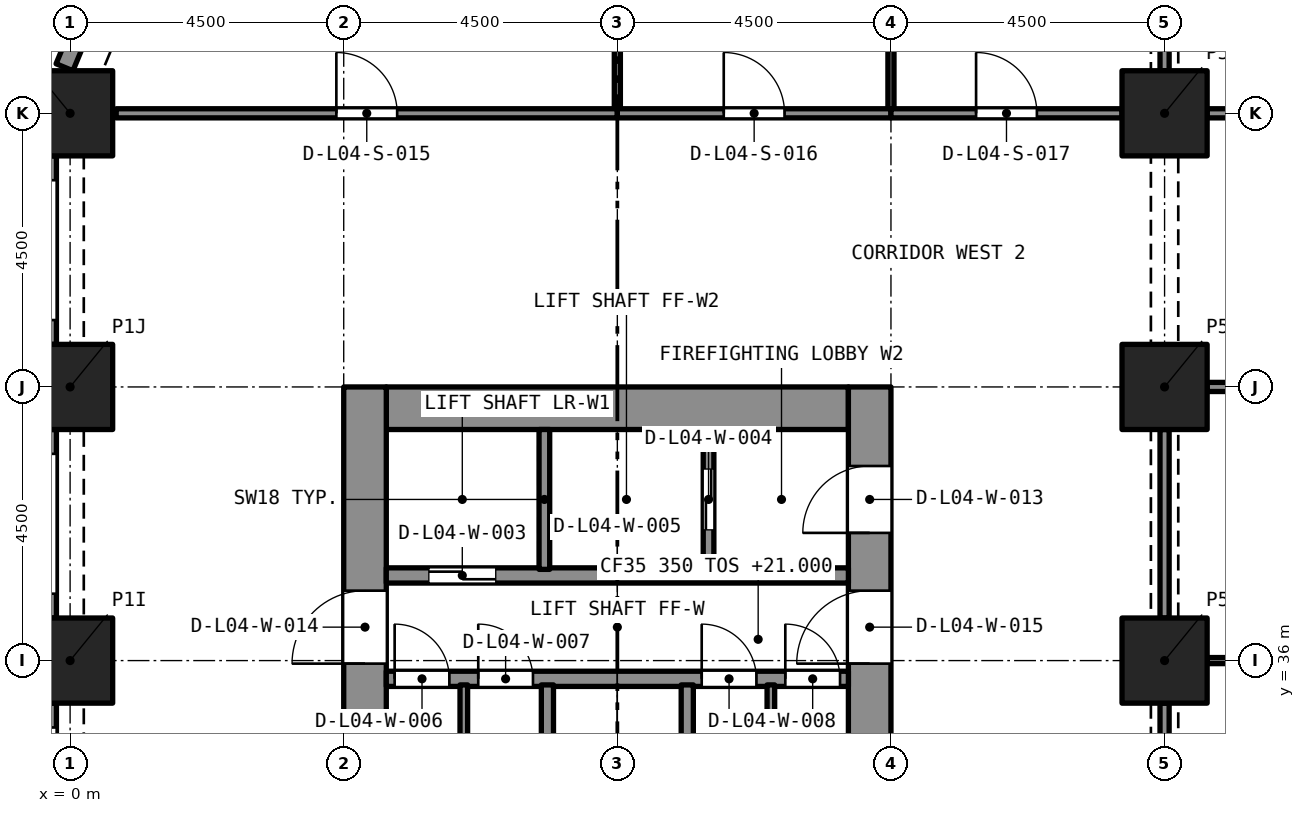
"""IFC4 building model, lengths in metres.
Left out: names, types, materials, properties, quantities, classifications, styles, units other than length and angle.
Written with IfcOpenShell. Run it as: python <this file> out.ifc"""

import sys

from ifc_helpers import new_model, si_unit, direction, frame, frame_2d, origin, origin_2d, place, context, subcontext, project, spatial, rectangle, extrude, element, fill, save


model = new_model("IFC4")
c1 = context("Model", 3, precision=1e-05, world=origin(), true_north=direction((0.0, 1.0)))
c2 = subcontext(c1, "Body", "Model", "MODEL_VIEW")
j1 = project(units=[si_unit("LENGTHUNIT", "METRE"), si_unit("PLANEANGLEUNIT", "RADIAN")], contexts=[c1])
p1 = place(None, origin())
s1 = spatial("IfcSite", under=j1, at=p1, CompositionType="ELEMENT")
p2 = place(p1, origin())
s2 = spatial("IfcBuilding", under=s1, at=p2, CompositionType="ELEMENT")
p3 = place(p2, frame((0.0, 0.0, 21.0)))
s3 = spatial("IfcBuildingStorey", under=s2, at=p3, CompositionType="ELEMENT", Elevation=21.0)
for number, where, z_axis, x_axis in (
    (1, (0.0, 36.0, 0.0), (0.0, 0.0, 1.0), (1.0, 0.0, 0.0)),
    (2, (18.0, 36.0, 0.0), (0.0, 0.0, 1.0), (1.0, 0.0, 0.0)),
    (3, (0.0, 40.5, 0.0), (0.0, 0.0, 1.0), (1.0, 0.0, 0.0)),
    (4, (18.0, 40.5, 0.0), (0.0, 0.0, 1.0), (1.0, 0.0, 0.0)),
    (5, (0.0, 45.0, 0.0), (0.0, 0.0, 1.0), (1.0, 0.0, 0.0)),
    (6, (18.0, 45.0, 0.0), (0.0, 0.0, 1.0), (1.0, 0.0, 0.0)),
):
    element("IfcColumn", number, at=place(p3, frame(where, z_axis=z_axis, x_axis=x_axis)), inside=s3, PredefinedType="COLUMN", context=c2, shape_type="SweptSolid", body=[
        extrude(rectangle(XDim=1.4, YDim=1.4, at=origin_2d()), origin(), (0.0, 0.0, 1.0), 5.0),
    ])
p4 = place(p3, frame((5.2, 40.15, 0.0), z_axis=(0.0, 0.0, 1.0), x_axis=(1.0, 0.0, 0.0)))
e7 = element("IfcWall", 7, at=p4, inside=s3, PredefinedType="SOLIDWALL", context=c2, shape_type="SweptSolid", body=[
    extrude(rectangle(XDim=7.6, YDim=0.7, at=frame_2d((3.8, 0.0))), origin(), (0.0, 0.0, 1.0), 5.0),
])
p5 = place(p3, frame((4.85, 27.0, 0.0), z_axis=(0.0, 0.0, 1.0), x_axis=(0.0, 1.0, 0.0)))
e8 = element("IfcWall", 8, at=p5, inside=s3, PredefinedType="SOLIDWALL", context=c2, shape_type="SweptSolid", body=[
    extrude(rectangle(XDim=13.5, YDim=0.7, at=frame_2d((6.75, 0.0))), origin(), (0.0, 0.0, 1.0), 5.0),
])
p6 = place(p5, frame((8.95, 0.0, 0.0)))
e9 = element("IfcOpeningElement", 9, at=p6, cuts=e8, PredefinedType="OPENING", context=c2, shape_type="SweptSolid", body=[
    extrude(rectangle(XDim=1.2, YDim=2.1, at=frame_2d((0.6, 1.05))), frame((0.0, 0.36, 0.0), z_axis=(0.0, -1.0, 0.0), x_axis=(1.0, 0.0, 0.0)), (0.0, 0.0, 1.0), 0.72),
])
p7 = place(p3, frame((13.15, 27.0, 0.0), z_axis=(0.0, 0.0, 1.0), x_axis=(0.0, 1.0, 0.0)))
e10 = element("IfcWall", 10, at=p7, inside=s3, PredefinedType="SOLIDWALL", context=c2, shape_type="SweptSolid", body=[
    extrude(rectangle(XDim=13.5, YDim=0.7, at=frame_2d((6.75, 0.0))), origin(), (0.0, 0.0, 1.0), 5.0),
])
p8 = place(p7, frame((11.1, 0.0, 0.0)))
e11 = element("IfcOpeningElement", 11, at=p8, cuts=e10, PredefinedType="OPENING", context=c2, shape_type="SweptSolid", body=[
    extrude(rectangle(XDim=1.1, YDim=2.1, at=frame_2d((0.55, 1.05))), frame((0.0, 0.36, 0.0), z_axis=(0.0, -1.0, 0.0), x_axis=(1.0, 0.0, 0.0)), (0.0, 0.0, 1.0), 0.72),
])
p9 = place(p7, frame((8.95, 0.0, 0.0)))
e12 = element("IfcOpeningElement", 12, at=p9, cuts=e10, PredefinedType="OPENING", context=c2, shape_type="SweptSolid", body=[
    extrude(rectangle(XDim=1.2, YDim=2.1, at=frame_2d((0.6, 1.05))), frame((0.0, 0.36, 0.0), z_axis=(0.0, -1.0, 0.0), x_axis=(1.0, 0.0, 0.0)), (0.0, 0.0, 1.0), 0.72),
])
p10 = place(p3, frame((-0.092, 45.757, 0.0), z_axis=(0.0, 0.0, 1.0), x_axis=(0.382737135771, 0.923857286003, 0.0)))
e13 = element("IfcWall", 13, at=p10, inside=s3, PredefinedType="SOLIDWALL", context=c2, shape_type="SweptSolid", body=[
    extrude(rectangle(XDim=1.865, YDim=0.3, at=frame_2d((0.933, 0.0))), origin(), (0.0, 0.0, 1.0), 5.0),
])
p11 = place(p10, frame((0.508, 0.0, 0.45)))
e14 = element("IfcOpeningElement", 14, at=p11, cuts=e13, PredefinedType="OPENING", context=c2, shape_type="SweptSolid", body=[
    extrude(rectangle(XDim=1.1, YDim=3.3, at=frame_2d((0.55, 1.65))), frame((0.0, 0.16, 0.0), z_axis=(0.0, -1.0, 0.0), x_axis=(1.0, 0.0, 0.0)), (0.0, 0.0, 1.0), 0.32),
])
p12 = place(p3, frame((-0.375, 41.2, 0.0), z_axis=(0.0, 0.0, 1.0), x_axis=(0.0, 1.0, 0.0)))
e15 = element("IfcWall", 15, at=p12, inside=s3, PredefinedType="SOLIDWALL", context=c2, shape_type="SweptSolid", body=[
    extrude(rectangle(XDim=3.1, YDim=0.3, at=frame_2d((1.55, 0.0))), origin(), (0.0, 0.0, 1.0), 5.0),
])
p13 = place(p12, frame((0.4, 0.0, 0.45)))
e16 = element("IfcOpeningElement", 16, at=p13, cuts=e15, PredefinedType="OPENING", context=c2, shape_type="SweptSolid", body=[
    extrude(rectangle(XDim=2.3, YDim=3.3, at=frame_2d((1.15, 1.65))), frame((0.0, 0.16, 0.0), z_axis=(0.0, -1.0, 0.0), x_axis=(1.0, 0.0, 0.0)), (0.0, 0.0, 1.0), 0.32),
])
p14 = place(p3, frame((-0.375, 36.7, 0.0), z_axis=(0.0, 0.0, 1.0), x_axis=(0.0, 1.0, 0.0)))
e17 = element("IfcWall", 17, at=p14, inside=s3, PredefinedType="SOLIDWALL", context=c2, shape_type="SweptSolid", body=[
    extrude(rectangle(XDim=3.1, YDim=0.3, at=frame_2d((1.55, 0.0))), origin(), (0.0, 0.0, 1.0), 5.0),
])
p15 = place(p14, frame((0.4, 0.0, 0.45)))
e18 = element("IfcOpeningElement", 18, at=p15, cuts=e17, PredefinedType="OPENING", context=c2, shape_type="SweptSolid", body=[
    extrude(rectangle(XDim=2.3, YDim=3.3, at=frame_2d((1.15, 1.65))), frame((0.0, 0.16, 0.0), z_axis=(0.0, -1.0, 0.0), x_axis=(1.0, 0.0, 0.0)), (0.0, 0.0, 1.0), 0.32),
])
p16 = place(p3, frame((-0.375, 32.2, 0.0), z_axis=(0.0, 0.0, 1.0), x_axis=(0.0, 1.0, 0.0)))
e19 = element("IfcWall", 19, at=p16, inside=s3, PredefinedType="SOLIDWALL", context=c2, shape_type="SweptSolid", body=[
    extrude(rectangle(XDim=3.1, YDim=0.3, at=frame_2d((1.55, 0.0))), origin(), (0.0, 0.0, 1.0), 5.0),
])
p17 = place(p16, frame((0.4, 0.0, 0.45)))
e20 = element("IfcOpeningElement", 20, at=p17, cuts=e19, PredefinedType="OPENING", context=c2, shape_type="SweptSolid", body=[
    extrude(rectangle(XDim=2.3, YDim=3.3, at=frame_2d((1.15, 1.65))), frame((0.0, 0.16, 0.0), z_axis=(0.0, -1.0, 0.0), x_axis=(1.0, 0.0, 0.0)), (0.0, 0.0, 1.0), 0.32),
])
p18 = place(p3, frame((5.2, 35.7, 0.0), z_axis=(0.0, 0.0, 1.0), x_axis=(1.0, 0.0, 0.0)))
e21 = element("IfcWall", 21, at=p18, inside=s3, PredefinedType="SOLIDWALL", context=c2, shape_type="SweptSolid", body=[
    extrude(rectangle(XDim=7.6, YDim=0.25, at=frame_2d((3.8, 0.0))), origin(), (0.0, 0.0, 1.0), 4.65),
])
p19 = place(p18, frame((0.137, 0.0, 0.0)))
e22 = element("IfcOpeningElement", 22, at=p19, cuts=e21, PredefinedType="OPENING", context=c2, shape_type="SweptSolid", body=[
    extrude(rectangle(XDim=0.9, YDim=2.1, at=frame_2d((0.45, 1.05))), frame((0.0, 0.135, 0.0), z_axis=(0.0, -1.0, 0.0), x_axis=(1.0, 0.0, 0.0)), (0.0, 0.0, 1.0), 0.27),
])
p20 = place(p18, frame((1.512, 0.0, 0.0)))
e23 = element("IfcOpeningElement", 23, at=p20, cuts=e21, PredefinedType="OPENING", context=c2, shape_type="SweptSolid", body=[
    extrude(rectangle(XDim=0.9, YDim=2.1, at=frame_2d((0.45, 1.05))), frame((0.0, 0.135, 0.0), z_axis=(0.0, -1.0, 0.0), x_axis=(1.0, 0.0, 0.0)), (0.0, 0.0, 1.0), 0.27),
])
p21 = place(p18, frame((5.188, 0.0, 0.0)))
e24 = element("IfcOpeningElement", 24, at=p21, cuts=e21, PredefinedType="OPENING", context=c2, shape_type="SweptSolid", body=[
    extrude(rectangle(XDim=0.9, YDim=2.1, at=frame_2d((0.45, 1.05))), frame((0.0, 0.135, 0.0), z_axis=(0.0, -1.0, 0.0), x_axis=(1.0, 0.0, 0.0)), (0.0, 0.0, 1.0), 0.27),
])
p22 = place(p18, frame((6.562, 0.0, 0.0)))
e25 = element("IfcOpeningElement", 25, at=p22, cuts=e21, PredefinedType="OPENING", context=c2, shape_type="SweptSolid", body=[
    extrude(rectangle(XDim=0.9, YDim=2.1, at=frame_2d((0.45, 1.05))), frame((0.0, 0.135, 0.0), z_axis=(0.0, -1.0, 0.0), x_axis=(1.0, 0.0, 0.0)), (0.0, 0.0, 1.0), 0.27),
])
p23 = place(p3, frame((5.2, 37.4, 0.0), z_axis=(0.0, 0.0, 1.0), x_axis=(1.0, 0.0, 0.0)))
e26 = element("IfcWall", 26, at=p23, inside=s3, PredefinedType="SOLIDWALL", context=c2, shape_type="SweptSolid", body=[
    extrude(rectangle(XDim=7.6, YDim=0.25, at=frame_2d((3.8, 0.0))), origin(), (0.0, 0.0, 1.0), 4.65),
])
p24 = place(p23, frame((0.7, 0.0, 0.0)))
e27 = element("IfcOpeningElement", 27, at=p24, cuts=e26, PredefinedType="OPENING", context=c2, shape_type="SweptSolid", body=[
    extrude(rectangle(XDim=1.1, YDim=2.4, at=frame_2d((0.55, 1.2))), frame((0.0, 0.135, 0.0), z_axis=(0.0, -1.0, 0.0), x_axis=(1.0, 0.0, 0.0)), (0.0, 0.0, 1.0), 0.27),
])
for number, where, z_axis, x_axis in (
    (28, (7.85, 33.3, 0.0), (0.0, 0.0, 1.0), (0.0, 1.0, 0.0)),
    (29, (10.15, 33.3, 0.0), (0.0, 0.0, 1.0), (0.0, 1.0, 0.0)),
):
    element("IfcWall", number, at=place(p3, frame(where, z_axis=z_axis, x_axis=x_axis)), inside=s3, PredefinedType="SOLIDWALL", context=c2, shape_type="SweptSolid", body=[
        extrude(rectangle(XDim=2.3, YDim=0.2, at=frame_2d((1.15, 0.0))), origin(), (0.0, 0.0, 1.0), 4.65),
    ])
p25 = place(p3, frame((7.8, 37.5, 0.0), z_axis=(0.0, 0.0, 1.0), x_axis=(0.0, 1.0, 0.0)))
e30 = element("IfcWall", 30, at=p25, inside=s3, PredefinedType="SOLIDWALL", context=c2, shape_type="SweptSolid", body=[
    extrude(rectangle(XDim=2.3, YDim=0.175, at=frame_2d((1.15, 0.0))), origin(), (0.0, 0.0, 1.0), 4.65),
])
p26 = place(p3, frame((10.5, 37.5, 0.0), z_axis=(0.0, 0.0, 1.0), x_axis=(0.0, 1.0, 0.0)))
e31 = element("IfcWall", 31, at=p26, inside=s3, PredefinedType="SOLIDWALL", context=c2, shape_type="SweptSolid", body=[
    extrude(rectangle(XDim=2.3, YDim=0.175, at=frame_2d((1.15, 0.0))), origin(), (0.0, 0.0, 1.0), 4.65),
])
p27 = place(p26, frame((0.65, 0.0, 0.0)))
e32 = element("IfcOpeningElement", 32, at=p27, cuts=e31, PredefinedType="OPENING", context=c2, shape_type="SweptSolid", body=[
    extrude(rectangle(XDim=1.0, YDim=2.1, at=frame_2d((0.5, 1.05))), frame((0.0, 0.097, 0.0), z_axis=(0.0, -1.0, 0.0), x_axis=(1.0, 0.0, 0.0)), (0.0, 0.0, 1.0), 0.195),
])
for number, where, z_axis, x_axis in (
    (33, (6.475, 33.3, 0.0), (0.0, 0.0, 1.0), (0.0, 1.0, 0.0)),
    (34, (11.525, 33.3, 0.0), (0.0, 0.0, 1.0), (0.0, 1.0, 0.0)),
):
    element("IfcWall", number, at=place(p3, frame(where, z_axis=z_axis, x_axis=x_axis)), inside=s3, PredefinedType="PARTITIONING", context=c2, shape_type="SweptSolid", body=[
        extrude(rectangle(XDim=2.3, YDim=0.125, at=frame_2d((1.15, 0.0))), origin(), (0.0, 0.0, 1.0), 4.65),
    ])
p28 = place(p3, frame((18.7, 36.0, 0.0), z_axis=(0.0, 0.0, 1.0), x_axis=(1.0, 0.0, 0.0)))
e35 = element("IfcWall", 35, at=p28, inside=s3, PredefinedType="PARTITIONING", context=c2, shape_type="SweptSolid", body=[
    extrude(rectangle(XDim=12.1, YDim=0.1, at=frame_2d((6.05, 0.0))), origin(), (0.0, 0.0, 1.0), 4.55),
])
p29 = place(p3, frame((18.0, 32.2, 0.0), z_axis=(0.0, 0.0, 1.0), x_axis=(0.0, 1.0, 0.0)))
e36 = element("IfcWall", 36, at=p29, inside=s3, PredefinedType="PARTITIONING", context=c2, shape_type="SweptSolid", body=[
    extrude(rectangle(XDim=3.1, YDim=0.15, at=frame_2d((1.55, 0.0))), origin(), (0.0, 0.0, 1.0), 4.18),
])
p30 = place(p3, frame((30.8, 40.5, 0.0), z_axis=(0.0, 0.0, 1.0), x_axis=(-1.0, 0.0, 0.0)))
e37 = element("IfcWall", 37, at=p30, inside=s3, PredefinedType="PARTITIONING", context=c2, shape_type="SweptSolid", body=[
    extrude(rectangle(XDim=12.1, YDim=0.15, at=frame_2d((6.05, 0.0))), origin(), (0.0, 0.0, 1.0), 4.55),
])
p31 = place(p30, frame((5.45, 0.0, 0.0)))
e38 = element("IfcOpeningElement", 38, at=p31, cuts=e37, PredefinedType="OPENING", context=c2, shape_type="SweptSolid", body=[
    extrude(rectangle(XDim=1.2, YDim=2.1, at=frame_2d((0.6, 1.05))), frame((0.0, 0.085, 0.0), z_axis=(0.0, -1.0, 0.0), x_axis=(1.0, 0.0, 0.0)), (0.0, 0.0, 1.0), 0.17),
])
p32 = place(p3, frame((18.0, 36.7, 0.0), z_axis=(0.0, 0.0, 1.0), x_axis=(0.0, 1.0, 0.0)))
e39 = element("IfcWall", 39, at=p32, inside=s3, PredefinedType="PARTITIONING", context=c2, shape_type="SweptSolid", body=[
    extrude(rectangle(XDim=3.1, YDim=0.15, at=frame_2d((1.55, 0.0))), origin(), (0.0, 0.0, 1.0), 4.18),
])
p33 = place(p3, frame((18.7, 45.0, 0.0), z_axis=(0.0, 0.0, 1.0), x_axis=(1.0, 0.0, 0.0)))
e40 = element("IfcWall", 40, at=p33, inside=s3, PredefinedType="PARTITIONING", context=c2, shape_type="SweptSolid", body=[
    extrude(rectangle(XDim=8.3, YDim=0.15, at=frame_2d((4.15, 0.0))), origin(), (0.0, 0.0, 1.0), 4.55),
])
p34 = place(p33, frame((3.75, 0.0, 0.0)))
e41 = element("IfcOpeningElement", 41, at=p34, cuts=e40, PredefinedType="OPENING", context=c2, shape_type="SweptSolid", body=[
    extrude(rectangle(XDim=0.8, YDim=2.1, at=frame_2d((0.4, 1.05))), frame((0.0, 0.085, 0.0), z_axis=(0.0, -1.0, 0.0), x_axis=(1.0, 0.0, 0.0)), (0.0, 0.0, 1.0), 0.17),
])
p35 = place(p3, frame((18.0, 45.7, 0.0), z_axis=(0.0, 0.0, 1.0), x_axis=(0.0, 1.0, 0.0)))
e42 = element("IfcWall", 42, at=p35, inside=s3, PredefinedType="PARTITIONING", context=c2, shape_type="SweptSolid", body=[
    extrude(rectangle(XDim=3.1, YDim=0.15, at=frame_2d((1.55, 0.0))), origin(), (0.0, 0.0, 1.0), 4.18),
])
p36 = place(p3, frame((9.0, 45.075, 0.0), z_axis=(0.0, 0.0, 1.0), x_axis=(0.0, 1.0, 0.0)))
e43 = element("IfcWall", 43, at=p36, inside=s3, PredefinedType="PARTITIONING", context=c2, shape_type="SweptSolid", body=[
    extrude(rectangle(XDim=3.725, YDim=0.1, at=frame_2d((1.863, 0.0))), origin(), (0.0, 0.0, 1.0), 4.65),
])
p37 = place(p3, frame((0.758, 45.0, 0.0), z_axis=(0.0, 0.0, 1.0), x_axis=(1.0, 0.0, 0.0)))
e44 = element("IfcWall", 44, at=p37, inside=s3, PredefinedType="PARTITIONING", context=c2, shape_type="SweptSolid", body=[
    extrude(rectangle(XDim=8.242, YDim=0.15, at=frame_2d((4.121, 0.0))), origin(), (0.0, 0.0, 1.0), 4.65),
])
p38 = place(p37, frame((3.621, 0.0, 0.0)))
e45 = element("IfcOpeningElement", 45, at=p38, cuts=e44, PredefinedType="OPENING", context=c2, shape_type="SweptSolid", body=[
    extrude(rectangle(XDim=1.0, YDim=2.1, at=frame_2d((0.5, 1.05))), frame((0.0, 0.085, 0.0), z_axis=(0.0, -1.0, 0.0), x_axis=(1.0, 0.0, 0.0)), (0.0, 0.0, 1.0), 0.17),
])
p39 = place(p3, frame((13.5, 45.075, 0.0), z_axis=(0.0, 0.0, 1.0), x_axis=(0.0, 1.0, 0.0)))
e46 = element("IfcWall", 46, at=p39, inside=s3, PredefinedType="PARTITIONING", context=c2, shape_type="SweptSolid", body=[
    extrude(rectangle(XDim=3.725, YDim=0.1, at=frame_2d((1.863, 0.0))), origin(), (0.0, 0.0, 1.0), 4.65),
])
p40 = place(p3, frame((9.0, 45.0, 0.0), z_axis=(0.0, 0.0, 1.0), x_axis=(1.0, 0.0, 0.0)))
e47 = element("IfcWall", 47, at=p40, inside=s3, PredefinedType="PARTITIONING", context=c2, shape_type="SweptSolid", body=[
    extrude(rectangle(XDim=4.5, YDim=0.15, at=frame_2d((2.25, 0.0))), origin(), (0.0, 0.0, 1.0), 4.65),
])
p41 = place(p40, frame((1.75, 0.0, 0.0)))
e48 = element("IfcOpeningElement", 48, at=p41, cuts=e47, PredefinedType="OPENING", context=c2, shape_type="SweptSolid", body=[
    extrude(rectangle(XDim=1.0, YDim=2.1, at=frame_2d((0.5, 1.05))), frame((0.0, 0.085, 0.0), z_axis=(0.0, -1.0, 0.0), x_axis=(1.0, 0.0, 0.0)), (0.0, 0.0, 1.0), 0.17),
])
p42 = place(p3, frame((13.5, 45.0, 0.0), z_axis=(0.0, 0.0, 1.0), x_axis=(1.0, 0.0, 0.0)))
e49 = element("IfcWall", 49, at=p42, inside=s3, PredefinedType="PARTITIONING", context=c2, shape_type="SweptSolid", body=[
    extrude(rectangle(XDim=3.8, YDim=0.15, at=frame_2d((1.9, 0.0))), origin(), (0.0, 0.0, 1.0), 4.65),
])
p43 = place(p42, frame((1.4, 0.0, 0.0)))
e50 = element("IfcOpeningElement", 50, at=p43, cuts=e49, PredefinedType="OPENING", context=c2, shape_type="SweptSolid", body=[
    extrude(rectangle(XDim=1.0, YDim=2.1, at=frame_2d((0.5, 1.05))), frame((0.0, 0.085, 0.0), z_axis=(0.0, -1.0, 0.0), x_axis=(1.0, 0.0, 0.0)), (0.0, 0.0, 1.0), 0.17),
])
p44 = place(p24, origin())
e51 = element("IfcDoor", 51, at=p44, inside=s3, OperationType="SLIDING_TO_LEFT", PredefinedType="DOOR", context=c2, shape_type="SweptSolid", body=[
    extrude(rectangle(XDim=1.1, YDim=2.4, at=frame_2d((0.55, 1.2))), frame((0.0, 0.025, 0.0), z_axis=(0.0, -1.0, 0.0), x_axis=(1.0, 0.0, 0.0)), (0.0, 0.0, 1.0), 0.05),
])
fill(e27, e51)
p45 = place(p27, origin())
e52 = element("IfcDoor", 52, at=p45, inside=s3, OperationType="SLIDING_TO_LEFT", PredefinedType="DOOR", context=c2, shape_type="SweptSolid", body=[
    extrude(rectangle(XDim=1.0, YDim=2.1, at=frame_2d((0.5, 1.05))), frame((0.0, 0.025, 0.0), z_axis=(0.0, -1.0, 0.0), x_axis=(1.0, 0.0, 0.0)), (0.0, 0.0, 1.0), 0.05),
])
fill(e32, e52)
p46 = place(p19, origin())
e53 = element("IfcDoor", 53, at=p46, inside=s3, OperationType="SINGLE_SWING_LEFT", PredefinedType="DOOR", context=c2, shape_type="SweptSolid", body=[
    extrude(rectangle(XDim=0.9, YDim=2.1, at=frame_2d((0.45, 1.05))), frame((0.0, 0.025, 0.0), z_axis=(0.0, -1.0, 0.0), x_axis=(1.0, 0.0, 0.0)), (0.0, 0.0, 1.0), 0.05),
])
fill(e22, e53)
p47 = place(p20, origin())
e54 = element("IfcDoor", 54, at=p47, inside=s3, OperationType="SINGLE_SWING_LEFT", PredefinedType="DOOR", context=c2, shape_type="SweptSolid", body=[
    extrude(rectangle(XDim=0.9, YDim=2.1, at=frame_2d((0.45, 1.05))), frame((0.0, 0.025, 0.0), z_axis=(0.0, -1.0, 0.0), x_axis=(1.0, 0.0, 0.0)), (0.0, 0.0, 1.0), 0.05),
])
fill(e23, e54)
p48 = place(p21, origin())
e55 = element("IfcDoor", 55, at=p48, inside=s3, OperationType="SINGLE_SWING_LEFT", PredefinedType="DOOR", context=c2, shape_type="SweptSolid", body=[
    extrude(rectangle(XDim=0.9, YDim=2.1, at=frame_2d((0.45, 1.05))), frame((0.0, 0.025, 0.0), z_axis=(0.0, -1.0, 0.0), x_axis=(1.0, 0.0, 0.0)), (0.0, 0.0, 1.0), 0.05),
])
fill(e24, e55)
p49 = place(p22, origin())
e56 = element("IfcDoor", 56, at=p49, inside=s3, OperationType="SINGLE_SWING_LEFT", PredefinedType="DOOR", context=c2, shape_type="SweptSolid", body=[
    extrude(rectangle(XDim=0.9, YDim=2.1, at=frame_2d((0.45, 1.05))), frame((0.0, 0.025, 0.0), z_axis=(0.0, -1.0, 0.0), x_axis=(1.0, 0.0, 0.0)), (0.0, 0.0, 1.0), 0.05),
])
fill(e25, e56)
p50 = place(p8, origin())
e57 = element("IfcDoor", 57, at=p50, inside=s3, OperationType="SINGLE_SWING_LEFT", PredefinedType="DOOR", context=c2, shape_type="SweptSolid", body=[
    extrude(rectangle(XDim=1.1, YDim=2.1, at=frame_2d((0.55, 1.05))), frame((0.0, 0.025, 0.0), z_axis=(0.0, -1.0, 0.0), x_axis=(1.0, 0.0, 0.0)), (0.0, 0.0, 1.0), 0.05),
])
fill(e11, e57)
p51 = place(p6, origin())
e58 = element("IfcDoor", 58, at=p51, inside=s3, OperationType="SINGLE_SWING_LEFT", PredefinedType="DOOR", context=c2, shape_type="SweptSolid", body=[
    extrude(rectangle(XDim=1.2, YDim=2.1, at=frame_2d((0.6, 1.05))), frame((0.0, 0.025, 0.0), z_axis=(0.0, -1.0, 0.0), x_axis=(1.0, 0.0, 0.0)), (0.0, 0.0, 1.0), 0.05),
])
fill(e9, e58)
p52 = place(p9, origin())
e59 = element("IfcDoor", 59, at=p52, inside=s3, OperationType="SINGLE_SWING_LEFT", PredefinedType="DOOR", context=c2, shape_type="SweptSolid", body=[
    extrude(rectangle(XDim=1.2, YDim=2.1, at=frame_2d((0.6, 1.05))), frame((0.0, 0.025, 0.0), z_axis=(0.0, -1.0, 0.0), x_axis=(1.0, 0.0, 0.0)), (0.0, 0.0, 1.0), 0.05),
])
fill(e12, e59)
p53 = place(p38, origin())
e60 = element("IfcDoor", 60, at=p53, inside=s3, OperationType="SINGLE_SWING_RIGHT", PredefinedType="DOOR", context=c2, shape_type="SweptSolid", body=[
    extrude(rectangle(XDim=1.0, YDim=2.1, at=frame_2d((0.5, 1.05))), frame((0.0, 0.025, 0.0), z_axis=(0.0, -1.0, 0.0), x_axis=(1.0, 0.0, 0.0)), (0.0, 0.0, 1.0), 0.05),
])
fill(e45, e60)
p54 = place(p41, origin())
e61 = element("IfcDoor", 61, at=p54, inside=s3, OperationType="SINGLE_SWING_RIGHT", PredefinedType="DOOR", context=c2, shape_type="SweptSolid", body=[
    extrude(rectangle(XDim=1.0, YDim=2.1, at=frame_2d((0.5, 1.05))), frame((0.0, 0.025, 0.0), z_axis=(0.0, -1.0, 0.0), x_axis=(1.0, 0.0, 0.0)), (0.0, 0.0, 1.0), 0.05),
])
fill(e48, e61)
p55 = place(p43, origin())
e62 = element("IfcDoor", 62, at=p55, inside=s3, OperationType="SINGLE_SWING_RIGHT", PredefinedType="DOOR", context=c2, shape_type="SweptSolid", body=[
    extrude(rectangle(XDim=1.0, YDim=2.1, at=frame_2d((0.5, 1.05))), frame((0.0, 0.025, 0.0), z_axis=(0.0, -1.0, 0.0), x_axis=(1.0, 0.0, 0.0)), (0.0, 0.0, 1.0), 0.05),
])
fill(e50, e62)
save(model, sys.argv[1])
